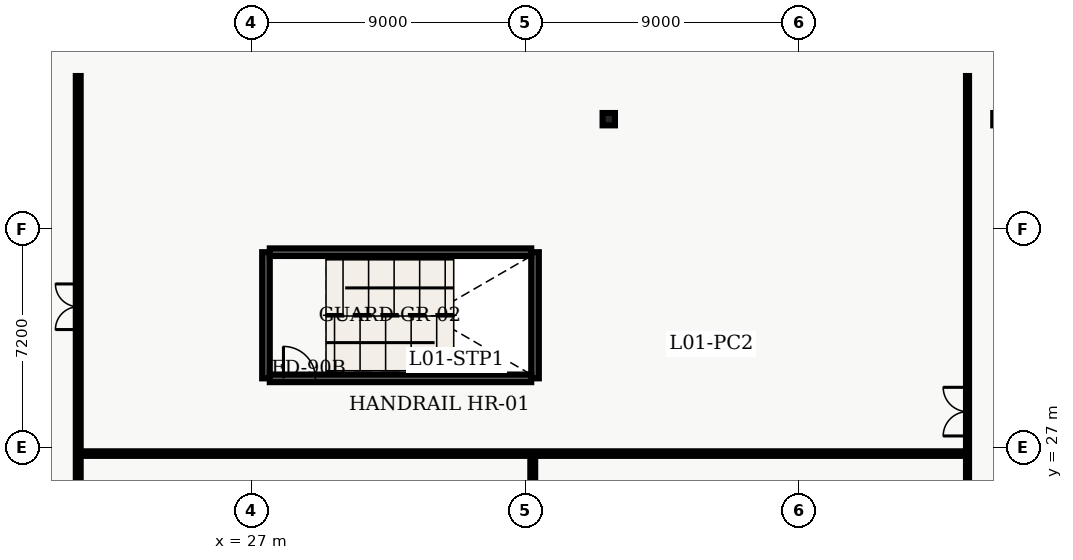
"""IFC4 building model, lengths in metres.
Left out: names, types, materials, properties, quantities, classifications, styles, units other than length and angle.
Written with IfcOpenShell. Run it as: python <this file> out.ifc"""

import sys

from ifc_helpers import new_model, entity, si_unit, converted_unit, direction, frame, origin_with_axes, origin_2d_with_axis, place, context, subcontext, project, spatial, polyline, rectangle, hollow_rectangle, outline, extrude, element, fill, save


model = new_model("IFC4")
c1 = context("Model", 3, precision=1e-05, world=origin_with_axes(), true_north=direction((0.0, 1.0)))
c2 = subcontext(c1, "Body", "Model", "MODEL_VIEW")
j1 = project(units=[si_unit("LENGTHUNIT", "METRE"), converted_unit("PLANEANGLEUNIT", "DEGREE", entity("IfcPlaneAngleMeasure", 0.017), si_unit("PLANEANGLEUNIT", "RADIAN"), dimensions=[0, 0, 0, 0, 0, 0, 0])], contexts=[c1])
p1 = place(None, origin_with_axes())
s1 = spatial("IfcSite", under=j1, at=p1, CompositionType="ELEMENT")
p2 = place(p1, origin_with_axes())
s2 = spatial("IfcBuilding", under=s1, at=p2, CompositionType="ELEMENT")
p3 = place(p2, frame((0.0, 0.0, 5.7), z_axis=(0.0, 0.0, 1.0), x_axis=(1.0, 0.0, 0.0)))
s3 = spatial("IfcBuildingStorey", under=s2, at=p3, CompositionType="ELEMENT", Elevation=5.7)
for number, where, z_axis, x_axis in (
    (1, (27.475, 29.275, 0.0), (0.0, 0.0, 1.0), (0.0, 1.0, 0.0)),
    (2, (36.325, 29.275, 0.0), (0.0, 0.0, 1.0), (0.0, 1.0, 0.0)),
):
    element("IfcWall", number, at=place(p3, frame(where, z_axis=z_axis, x_axis=x_axis)), inside=s3, PredefinedType="SHEAR", context=c2, shape_type="SweptSolid", body=[
        extrude(outline(polyline([(0.0, -0.125), (4.15, -0.125), (4.15, 0.125), (0.0, 0.125), (0.0, -0.125)])), origin_with_axes(), (0.0, 0.0, 1.0), 4.86),
    ])
p4 = place(p3, frame((27.6, 29.275, 0.0), z_axis=(0.0, 0.0, 1.0), x_axis=(1.0, 0.0, 0.0)))
e3 = element("IfcWall", 3, at=p4, inside=s3, PredefinedType="SHEAR", context=c2, shape_type="SweptSolid", body=[
    extrude(outline(polyline([(0.0, -0.125), (8.6, -0.125), (8.6, 0.125), (0.0, 0.125), (0.0, -0.125)])), origin_with_axes(), (0.0, 0.0, 1.0), 4.86),
])
p5 = place(p4, frame((0.975, 0.0, 0.0), z_axis=(0.0, 0.0, 1.0), x_axis=(1.0, 0.0, 0.0)))
e4 = element("IfcOpeningElement", 4, at=p5, cuts=e3, PredefinedType="OPENING", context=c2, shape_type="SweptSolid", body=[
    extrude(rectangle(XDim=1.05, YDim=0.27, at=origin_2d_with_axis()), origin_with_axes(), (0.0, 0.0, 1.0), 2.15),
])
p6 = place(p3, frame((27.6, 33.425, 0.0), z_axis=(0.0, 0.0, 1.0), x_axis=(1.0, 0.0, 0.0)))
e5 = element("IfcWall", 5, at=p6, inside=s3, PredefinedType="SHEAR", context=c2, shape_type="SweptSolid", body=[
    extrude(outline(polyline([(0.0, -0.125), (8.6, -0.125), (8.6, 0.125), (0.0, 0.125), (0.0, -0.125)])), origin_with_axes(), (0.0, 0.0, 1.0), 4.86),
])
for number, where, z_axis, x_axis in (
    (6, (38.75, 37.8, 0.0), (0.0, 0.0, 1.0), (1.0, 0.0, 0.0)),
    (7, (51.6, 37.8, 0.0), (0.0, 0.0, 1.0), (1.0, 0.0, 0.0)),
):
    element("IfcColumn", number, at=place(p3, frame(where, z_axis=z_axis, x_axis=x_axis)), inside=s3, PredefinedType="COLUMN", context=c2, shape_type="SweptSolid", body=[
        extrude(hollow_rectangle(XDim=0.406, YDim=0.406, WallThickness=0.015, InnerFilletRadius=0.015, OuterFilletRadius=0.03, at=origin_2d_with_axis()), origin_with_axes(), (0.0, 0.0, 1.0), 5.1),
    ])
p7 = place(p3, frame((21.3, 0.38, 0.0), z_axis=(0.0, 0.0, 1.0), x_axis=(0.0, 1.0, 0.0)))
e8 = element("IfcWall", 8, at=p7, inside=s3, PredefinedType="PARTITIONING", context=c2, shape_type="SweptSolid", body=[
    extrude(outline(polyline([(0.0, -0.08), (38.84, -0.08), (38.84, 0.08), (0.0, 0.08), (0.0, -0.08)])), origin_with_axes(), (0.0, 0.0, 1.0), 3.2),
])
p8 = place(p7, frame((13.025, 0.0, 0.0), z_axis=(0.0, 0.0, 1.0), x_axis=(1.0, 0.0, 0.0)))
e9 = element("IfcOpeningElement", 9, at=p8, cuts=e8, PredefinedType="OPENING", context=c2, shape_type="SweptSolid", body=[
    extrude(rectangle(XDim=1.05, YDim=0.18, at=origin_2d_with_axis()), origin_with_axes(), (0.0, 0.0, 1.0), 2.15),
])
p9 = place(p7, frame((31.25, 0.0, 0.0), z_axis=(0.0, 0.0, 1.0), x_axis=(1.0, 0.0, 0.0)))
e10 = element("IfcOpeningElement", 10, at=p9, cuts=e8, PredefinedType="OPENING", context=c2, shape_type="SweptSolid", body=[
    extrude(rectangle(XDim=1.5, YDim=0.18, at=origin_2d_with_axis()), origin_with_axes(), (0.0, 0.0, 1.0), 2.2),
])
p10 = place(p3, frame((36.25, 4.3, 0.0), z_axis=(0.0, 0.0, 1.0), x_axis=(0.0, 1.0, 0.0)))
e11 = element("IfcWall", 11, at=p10, inside=s3, PredefinedType="PARTITIONING", context=c2, shape_type="SweptSolid", body=[
    extrude(outline(polyline([(0.0, -0.08), (22.5, -0.08), (22.5, 0.08), (0.0, 0.08), (0.0, -0.08)])), origin_with_axes(), (0.0, 0.0, 1.0), 3.2),
])
p11 = place(p3, frame((50.55, 0.38, 0.0), z_axis=(0.0, 0.0, 1.0), x_axis=(0.0, 1.0, 0.0)))
e12 = element("IfcWall", 12, at=p11, inside=s3, PredefinedType="PARTITIONING", context=c2, shape_type="SweptSolid", body=[
    extrude(outline(polyline([(0.0, -0.05), (38.84, -0.05), (38.84, 0.05), (0.0, 0.05), (0.0, -0.05)])), origin_with_axes(), (0.0, 0.0, 1.0), 3.2),
])
p12 = place(p11, frame((12.8, 0.0, 0.0), z_axis=(0.0, 0.0, 1.0), x_axis=(1.0, 0.0, 0.0)))
e13 = element("IfcOpeningElement", 13, at=p12, cuts=e12, PredefinedType="OPENING", context=c2, shape_type="SweptSolid", body=[
    extrude(rectangle(XDim=1.6, YDim=0.12, at=origin_2d_with_axis()), origin_with_axes(), (0.0, 0.0, 1.0), 2.2),
])
p13 = place(p11, frame((27.8, 0.0, 0.0), z_axis=(0.0, 0.0, 1.0), x_axis=(1.0, 0.0, 0.0)))
e14 = element("IfcOpeningElement", 14, at=p13, cuts=e12, PredefinedType="OPENING", context=c2, shape_type="SweptSolid", body=[
    extrude(rectangle(XDim=1.6, YDim=0.12, at=origin_2d_with_axis()), origin_with_axes(), (0.0, 0.0, 1.0), 2.2),
])
p14 = place(p3, frame((21.3, 26.8, 0.0), z_axis=(0.0, 0.0, 1.0), x_axis=(1.0, 0.0, 0.0)))
e15 = element("IfcWall", 15, at=p14, inside=s3, PredefinedType="PARTITIONING", context=c2, shape_type="SweptSolid", body=[
    extrude(outline(polyline([(0.0, -0.075), (29.25, -0.075), (29.25, 0.075), (0.0, 0.075), (0.0, -0.075)])), origin_with_axes(), (0.0, 0.0, 1.0), 3.2),
])
p15 = place(p4, frame((0.975, 0.0, 0.0), z_axis=(0.0, 0.0, 1.0), x_axis=(1.0, 0.0, 0.0)))
e16 = element("IfcDoor", 16, at=p15, inside=s3, OperationType="SINGLE_SWING_LEFT", PredefinedType="DOOR", context=c2, shape_type="SweptSolid", body=[
    extrude(rectangle(XDim=1.05, YDim=0.09, at=origin_2d_with_axis()), origin_with_axes(), (0.0, 0.0, 1.0), 2.15),
])
fill(e4, e16)
p16 = place(p7, frame((31.25, 0.0, 0.0), z_axis=(0.0, 0.0, 1.0), x_axis=(1.0, 0.0, 0.0)))
e17 = element("IfcDoor", 17, at=p16, inside=s3, OperationType="DOUBLE_DOOR_SINGLE_SWING", PredefinedType="DOOR", context=c2, shape_type="SweptSolid", body=[
    extrude(rectangle(XDim=1.5, YDim=0.09, at=origin_2d_with_axis()), origin_with_axes(), (0.0, 0.0, 1.0), 2.2),
])
fill(e10, e17)
p17 = place(p11, frame((27.8, 0.0, 0.0), z_axis=(0.0, 0.0, 1.0), x_axis=(1.0, 0.0, 0.0)))
e18 = element("IfcDoor", 18, at=p17, inside=s3, OperationType="DOUBLE_DOOR_SINGLE_SWING", PredefinedType="DOOR", context=c2, shape_type="SweptSolid", body=[
    extrude(rectangle(XDim=1.6, YDim=0.06, at=origin_2d_with_axis()), origin_with_axes(), (0.0, 0.0, 1.0), 2.2),
])
fill(e14, e18)
save(model, sys.argv[1])
